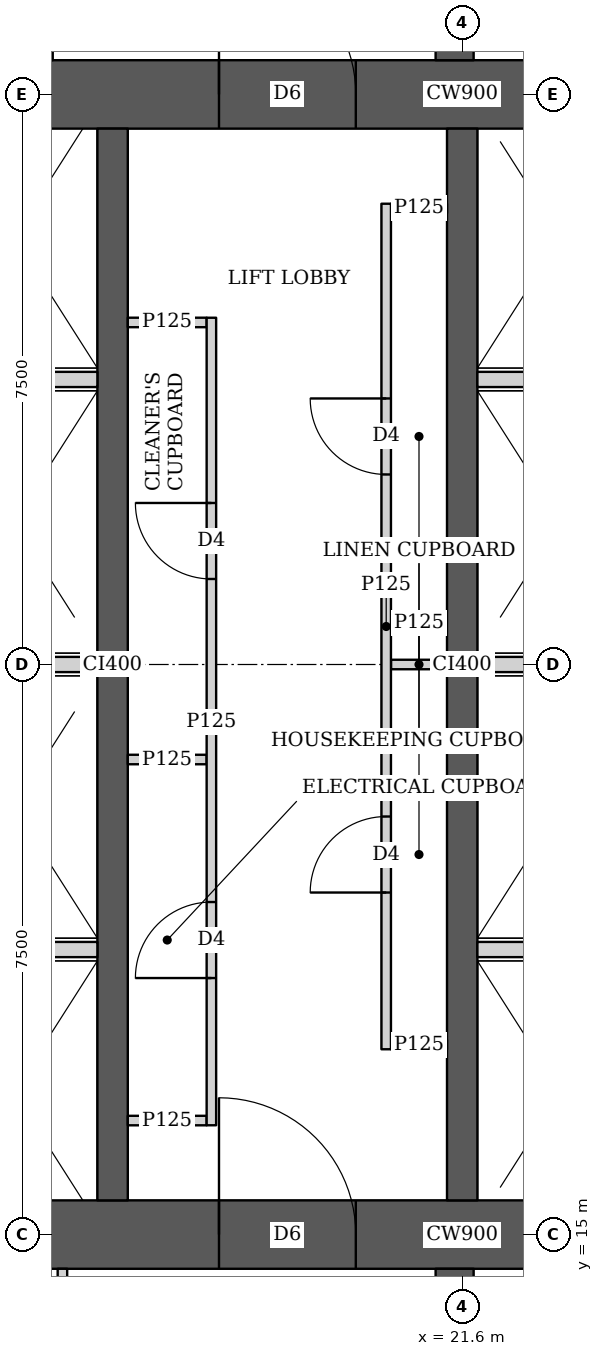
"""IFC4 building model, lengths in metres.
Left out: names, types, materials, properties, quantities, classifications, styles, units other than length and angle.
Written with IfcOpenShell. Run it as: python <this file> out.ifc"""

import sys

from ifc_helpers import new_model, si_unit, direction, frame, frame_2d, origin, place, context, subcontext, project, spatial, rectangle, extrude, element, fill, save


model = new_model("IFC4")
c1 = context("Model", 3, precision=1e-05, world=origin(), true_north=direction((0.0, 1.0)))
c2 = subcontext(c1, "Body", "Model", "MODEL_VIEW")
j1 = project(units=[si_unit("LENGTHUNIT", "METRE"), si_unit("PLANEANGLEUNIT", "RADIAN")], contexts=[c1])
p1 = place(None, origin())
s1 = spatial("IfcSite", under=j1, at=p1, CompositionType="ELEMENT")
p2 = place(p1, origin())
s2 = spatial("IfcBuilding", under=s1, at=p2, CompositionType="ELEMENT")
p3 = place(p2, frame((0.0, 0.0, 10.1)))
s3 = spatial("IfcBuildingStorey", under=s2, at=p3, CompositionType="ELEMENT", Elevation=10.1)
p4 = place(p3, frame((13.95, 15.0, 0.0), z_axis=(0.0, 0.0, 1.0), x_axis=(1.0, 0.0, 0.0)))
e1 = element("IfcWall", 1, at=p4, inside=s3, PredefinedType="SHEAR", context=c2, shape_type="SweptSolid", body=[
    extrude(rectangle(XDim=15.3, YDim=0.9, at=frame_2d((7.65, 0.0))), origin(), (0.0, 0.0, 1.0), 4.5),
])
p5 = place(p4, frame((4.45, 0.0, 0.0)))
e2 = element("IfcOpeningElement", 2, at=p5, cuts=e1, PredefinedType="OPENING", context=c2, shape_type="SweptSolid", body=[
    extrude(rectangle(XDim=1.8, YDim=2.1, at=frame_2d((0.9, 1.05))), frame((0.0, 0.46, 0.0), z_axis=(0.0, -1.0, 0.0), x_axis=(1.0, 0.0, 0.0)), (0.0, 0.0, 1.0), 0.92),
])
p6 = place(p4, frame((10.7, 0.0, 0.0)))
e3 = element("IfcOpeningElement", 3, at=p6, cuts=e1, PredefinedType="OPENING", context=c2, shape_type="SweptSolid", body=[
    extrude(rectangle(XDim=1.1, YDim=2.1, at=frame_2d((0.55, 1.05))), frame((0.0, 0.46, 0.0), z_axis=(0.0, -1.0, 0.0), x_axis=(1.0, 0.0, 0.0)), (0.0, 0.0, 1.0), 0.92),
])
p7 = place(p3, frame((13.95, 30.0, 0.0), z_axis=(0.0, 0.0, 1.0), x_axis=(1.0, 0.0, 0.0)))
e4 = element("IfcWall", 4, at=p7, inside=s3, PredefinedType="SHEAR", context=c2, shape_type="SweptSolid", body=[
    extrude(rectangle(XDim=15.3, YDim=0.9, at=frame_2d((7.65, 0.0))), origin(), (0.0, 0.0, 1.0), 4.5),
])
p8 = place(p7, frame((4.45, 0.0, 0.0)))
e5 = element("IfcOpeningElement", 5, at=p8, cuts=e4, PredefinedType="OPENING", context=c2, shape_type="SweptSolid", body=[
    extrude(rectangle(XDim=1.8, YDim=2.1, at=frame_2d((0.9, 1.05))), frame((0.0, 0.46, 0.0), z_axis=(0.0, -1.0, 0.0), x_axis=(1.0, 0.0, 0.0)), (0.0, 0.0, 1.0), 0.92),
])
p9 = place(p7, frame((10.7, 0.0, 0.0)))
e6 = element("IfcOpeningElement", 6, at=p9, cuts=e4, PredefinedType="OPENING", context=c2, shape_type="SweptSolid", body=[
    extrude(rectangle(XDim=1.1, YDim=2.1, at=frame_2d((0.55, 1.05))), frame((0.0, 0.46, 0.0), z_axis=(0.0, -1.0, 0.0), x_axis=(1.0, 0.0, 0.0)), (0.0, 0.0, 1.0), 0.92),
])
for number, where, z_axis, x_axis in (
    (7, (17.0, 15.45, 0.0), (0.0, 0.0, 1.0), (0.0, 1.0, 0.0)),
    (8, (21.6, 15.45, 0.0), (0.0, 0.0, 1.0), (0.0, 1.0, 0.0)),
):
    element("IfcWall", number, at=place(p3, frame(where, z_axis=z_axis, x_axis=x_axis)), inside=s3, PredefinedType="SHEAR", context=c2, shape_type="SweptSolid", body=[
        extrude(rectangle(XDim=14.1, YDim=0.4, at=frame_2d((7.05, 0.0))), origin(), (0.0, 0.0, 1.0), 4.5),
    ])
for number, where, z_axis, x_axis in (
    (9, (21.5, 10.35, 0.0), (0.0, 0.0, 1.0), (0.0, 1.0, 0.0)),
    (10, (21.5, 30.45, 0.0), (0.0, 0.0, 1.0), (0.0, 1.0, 0.0)),
):
    element("IfcWall", number, at=place(p3, frame(where, z_axis=z_axis, x_axis=x_axis)), inside=s3, PredefinedType="SHEAR", context=c2, shape_type="SweptSolid", body=[
        extrude(rectangle(XDim=4.2, YDim=0.5, at=frame_2d((2.1, 0.0))), origin(), (0.0, 0.0, 1.0), 4.5),
    ])
p10 = place(p3, frame((16.34, 10.163, 0.0), z_axis=(0.0, 0.0, 1.0), x_axis=(0.0, 1.0, 0.0)))
e11 = element("IfcWall", 11, at=p10, inside=s3, PredefinedType="PARTITIONING", context=c2, shape_type="SweptSolid", body=[
    extrude(rectangle(XDim=4.387, YDim=0.125, at=frame_2d((2.193, 0.0))), origin(), (0.0, 0.0, 1.0), 4.2),
])
p11 = place(p10, frame((1.637, 0.0, 0.0)))
e12 = element("IfcOpeningElement", 12, at=p11, cuts=e11, PredefinedType="OPENING", context=c2, shape_type="SweptSolid", body=[
    extrude(rectangle(XDim=1.0, YDim=2.1, at=frame_2d((0.5, 1.05))), frame((0.0, 0.073, 0.0), z_axis=(0.0, -1.0, 0.0), x_axis=(1.0, 0.0, 0.0)), (0.0, 0.0, 1.0), 0.145),
])
p12 = place(p3, frame((16.15, 30.45, 0.0), z_axis=(0.0, 0.0, 1.0), x_axis=(0.0, 1.0, 0.0)))
e13 = element("IfcWall", 13, at=p12, inside=s3, PredefinedType="PARTITIONING", context=c2, shape_type="SweptSolid", body=[
    extrude(rectangle(XDim=4.387, YDim=0.125, at=frame_2d((2.193, 0.0))), origin(), (0.0, 0.0, 1.0), 4.2),
])
p13 = place(p12, frame((1.75, 0.0, 0.0)))
e14 = element("IfcOpeningElement", 14, at=p13, cuts=e13, PredefinedType="OPENING", context=c2, shape_type="SweptSolid", body=[
    extrude(rectangle(XDim=1.0, YDim=2.1, at=frame_2d((0.5, 1.05))), frame((0.0, 0.073, 0.0), z_axis=(0.0, -1.0, 0.0), x_axis=(1.0, 0.0, 0.0)), (0.0, 0.0, 1.0), 0.145),
])
p14 = place(p3, frame((20.6, 17.438, 0.0), z_axis=(0.0, 0.0, 1.0), x_axis=(0.0, 1.0, 0.0)))
e15 = element("IfcWall", 15, at=p14, inside=s3, PredefinedType="PARTITIONING", context=c2, shape_type="SweptSolid", body=[
    extrude(rectangle(XDim=11.124, YDim=0.125, at=frame_2d((5.562, 0.0))), origin(), (0.0, 0.0, 1.0), 4.2),
])
p15 = place(p14, frame((2.062, 0.0, 0.0)))
e16 = element("IfcOpeningElement", 16, at=p15, cuts=e15, PredefinedType="OPENING", context=c2, shape_type="SweptSolid", body=[
    extrude(rectangle(XDim=1.0, YDim=2.1, at=frame_2d((0.5, 1.05))), frame((0.0, 0.073, 0.0), z_axis=(0.0, -1.0, 0.0), x_axis=(1.0, 0.0, 0.0)), (0.0, 0.0, 1.0), 0.145),
])
p16 = place(p14, frame((7.562, 0.0, 0.0)))
e17 = element("IfcOpeningElement", 17, at=p16, cuts=e15, PredefinedType="OPENING", context=c2, shape_type="SweptSolid", body=[
    extrude(rectangle(XDim=1.0, YDim=2.1, at=frame_2d((0.5, 1.05))), frame((0.0, 0.073, 0.0), z_axis=(0.0, -1.0, 0.0), x_axis=(1.0, 0.0, 0.0)), (0.0, 0.0, 1.0), 0.145),
])
for number, where, z_axis, x_axis in (
    (18, (20.663, 17.5, 0.0), (0.0, 0.0, 1.0), (1.0, 0.0, 0.0)),
    (19, (20.663, 28.5, 0.0), (0.0, 0.0, 1.0), (1.0, 0.0, 0.0)),
    (20, (20.663, 22.5, 0.0), (0.0, 0.0, 1.0), (1.0, 0.0, 0.0)),
):
    element("IfcWall", number, at=place(p3, frame(where, z_axis=z_axis, x_axis=x_axis)), inside=s3, PredefinedType="PARTITIONING", context=c2, shape_type="SweptSolid", body=[
        extrude(rectangle(XDim=0.737, YDim=0.125, at=frame_2d((0.368, 0.0))), origin(), (0.0, 0.0, 1.0), 4.2),
    ])
p17 = place(p3, frame((18.3, 27.062, 0.0), z_axis=(0.0, 0.0, 1.0), x_axis=(0.0, -1.0, 0.0)))
e21 = element("IfcWall", 21, at=p17, inside=s3, PredefinedType="PARTITIONING", context=c2, shape_type="SweptSolid", body=[
    extrude(rectangle(XDim=10.624, YDim=0.125, at=frame_2d((5.312, 0.0))), origin(), (0.0, 0.0, 1.0), 4.2),
])
p18 = place(p17, frame((7.687, 0.0, 0.0)))
e22 = element("IfcOpeningElement", 22, at=p18, cuts=e21, PredefinedType="OPENING", context=c2, shape_type="SweptSolid", body=[
    extrude(rectangle(XDim=1.0, YDim=2.1, at=frame_2d((0.5, 1.05))), frame((0.0, 0.073, 0.0), z_axis=(0.0, -1.0, 0.0), x_axis=(1.0, 0.0, 0.0)), (0.0, 0.0, 1.0), 0.145),
])
p19 = place(p17, frame((2.437, 0.0, 0.0)))
e23 = element("IfcOpeningElement", 23, at=p19, cuts=e21, PredefinedType="OPENING", context=c2, shape_type="SweptSolid", body=[
    extrude(rectangle(XDim=1.0, YDim=2.1, at=frame_2d((0.5, 1.05))), frame((0.0, 0.073, 0.0), z_axis=(0.0, -1.0, 0.0), x_axis=(1.0, 0.0, 0.0)), (0.0, 0.0, 1.0), 0.145),
])
for number, where, z_axis, x_axis in (
    (24, (17.2, 16.5, 0.0), (0.0, 0.0, 1.0), (1.0, 0.0, 0.0)),
    (25, (17.2, 27.0, 0.0), (0.0, 0.0, 1.0), (1.0, 0.0, 0.0)),
    (26, (17.2, 21.25, 0.0), (0.0, 0.0, 1.0), (1.0, 0.0, 0.0)),
):
    element("IfcWall", number, at=place(p3, frame(where, z_axis=z_axis, x_axis=x_axis)), inside=s3, PredefinedType="PARTITIONING", context=c2, shape_type="SweptSolid", body=[
        extrude(rectangle(XDim=1.038, YDim=0.125, at=frame_2d((0.519, 0.0))), origin(), (0.0, 0.0, 1.0), 4.2),
    ])
p20 = place(p3, frame((14.85, 18.75, 0.0), z_axis=(0.0, 0.0, 1.0), x_axis=(1.0, 0.0, 0.0)))
e27 = element("IfcWall", 27, at=p20, inside=s3, PredefinedType="SOLIDWALL", context=c2, shape_type="SweptSolid", body=[
    extrude(rectangle(XDim=1.95, YDim=0.2, at=frame_2d((0.975, 0.0))), origin(), (0.0, 0.0, 1.0), 4.2),
])
p21 = place(p3, frame((21.8, 18.75, 0.0), z_axis=(0.0, 0.0, 1.0), x_axis=(1.0, 0.0, 0.0)))
e28 = element("IfcWall", 28, at=p21, inside=s3, PredefinedType="SOLIDWALL", context=c2, shape_type="SweptSolid", body=[
    extrude(rectangle(XDim=2.2, YDim=0.2, at=frame_2d((1.1, 0.0))), origin(), (0.0, 0.0, 1.0), 4.2),
])
p22 = place(p3, frame((14.85, 22.5, 0.0), z_axis=(0.0, 0.0, 1.0), x_axis=(1.0, 0.0, 0.0)))
e29 = element("IfcWall", 29, at=p22, inside=s3, PredefinedType="SOLIDWALL", context=c2, shape_type="SweptSolid", body=[
    extrude(rectangle(XDim=1.95, YDim=0.2, at=frame_2d((0.975, 0.0))), origin(), (0.0, 0.0, 1.0), 4.2),
])
p23 = place(p3, frame((21.8, 22.5, 0.0), z_axis=(0.0, 0.0, 1.0), x_axis=(1.0, 0.0, 0.0)))
e30 = element("IfcWall", 30, at=p23, inside=s3, PredefinedType="SOLIDWALL", context=c2, shape_type="SweptSolid", body=[
    extrude(rectangle(XDim=2.2, YDim=0.2, at=frame_2d((1.1, 0.0))), origin(), (0.0, 0.0, 1.0), 4.2),
])
p24 = place(p3, frame((14.85, 26.25, 0.0), z_axis=(0.0, 0.0, 1.0), x_axis=(1.0, 0.0, 0.0)))
e31 = element("IfcWall", 31, at=p24, inside=s3, PredefinedType="SOLIDWALL", context=c2, shape_type="SweptSolid", body=[
    extrude(rectangle(XDim=1.95, YDim=0.2, at=frame_2d((0.975, 0.0))), origin(), (0.0, 0.0, 1.0), 4.2),
])
p25 = place(p3, frame((21.8, 26.25, 0.0), z_axis=(0.0, 0.0, 1.0), x_axis=(1.0, 0.0, 0.0)))
e32 = element("IfcWall", 32, at=p25, inside=s3, PredefinedType="SOLIDWALL", context=c2, shape_type="SweptSolid", body=[
    extrude(rectangle(XDim=2.2, YDim=0.2, at=frame_2d((1.1, 0.0))), origin(), (0.0, 0.0, 1.0), 4.2),
])
p26 = place(p15, origin())
e33 = element("IfcDoor", 33, at=p26, inside=s3, OperationType="SINGLE_SWING_LEFT", PredefinedType="DOOR", context=c2, shape_type="SweptSolid", body=[
    extrude(rectangle(XDim=1.0, YDim=2.1, at=frame_2d((0.5, 1.05))), frame((0.0, 0.025, 0.0), z_axis=(0.0, -1.0, 0.0), x_axis=(1.0, 0.0, 0.0)), (0.0, 0.0, 1.0), 0.05),
])
fill(e16, e33)
p27 = place(p16, origin())
e34 = element("IfcDoor", 34, at=p27, inside=s3, OperationType="SINGLE_SWING_RIGHT", PredefinedType="DOOR", context=c2, shape_type="SweptSolid", body=[
    extrude(rectangle(XDim=1.0, YDim=2.1, at=frame_2d((0.5, 1.05))), frame((0.0, 0.025, 0.0), z_axis=(0.0, -1.0, 0.0), x_axis=(1.0, 0.0, 0.0)), (0.0, 0.0, 1.0), 0.05),
])
fill(e17, e34)
p28 = place(p18, origin())
e35 = element("IfcDoor", 35, at=p28, inside=s3, OperationType="SINGLE_SWING_LEFT", PredefinedType="DOOR", context=c2, shape_type="SweptSolid", body=[
    extrude(rectangle(XDim=1.0, YDim=2.1, at=frame_2d((0.5, 1.05))), frame((0.0, 0.025, 0.0), z_axis=(0.0, -1.0, 0.0), x_axis=(1.0, 0.0, 0.0)), (0.0, 0.0, 1.0), 0.05),
])
fill(e22, e35)
p29 = place(p19, origin())
e36 = element("IfcDoor", 36, at=p29, inside=s3, OperationType="SINGLE_SWING_RIGHT", PredefinedType="DOOR", context=c2, shape_type="SweptSolid", body=[
    extrude(rectangle(XDim=1.0, YDim=2.1, at=frame_2d((0.5, 1.05))), frame((0.0, 0.025, 0.0), z_axis=(0.0, -1.0, 0.0), x_axis=(1.0, 0.0, 0.0)), (0.0, 0.0, 1.0), 0.05),
])
fill(e23, e36)
p30 = place(p5, origin())
e37 = element("IfcDoor", 37, at=p30, inside=s3, OperationType="DOUBLE_DOOR_SINGLE_SWING", PredefinedType="DOOR", context=c2, shape_type="SweptSolid", body=[
    extrude(rectangle(XDim=1.8, YDim=2.1, at=frame_2d((0.9, 1.05))), frame((0.0, 0.025, 0.0), z_axis=(0.0, -1.0, 0.0), x_axis=(1.0, 0.0, 0.0)), (0.0, 0.0, 1.0), 0.05),
])
fill(e2, e37)
p31 = place(p8, origin())
e38 = element("IfcDoor", 38, at=p31, inside=s3, OperationType="DOUBLE_DOOR_SINGLE_SWING", PredefinedType="DOOR", context=c2, shape_type="SweptSolid", body=[
    extrude(rectangle(XDim=1.8, YDim=2.1, at=frame_2d((0.9, 1.05))), frame((0.0, 0.025, 0.0), z_axis=(0.0, -1.0, 0.0), x_axis=(1.0, 0.0, 0.0)), (0.0, 0.0, 1.0), 0.05),
])
fill(e5, e38)
save(model, sys.argv[1])
